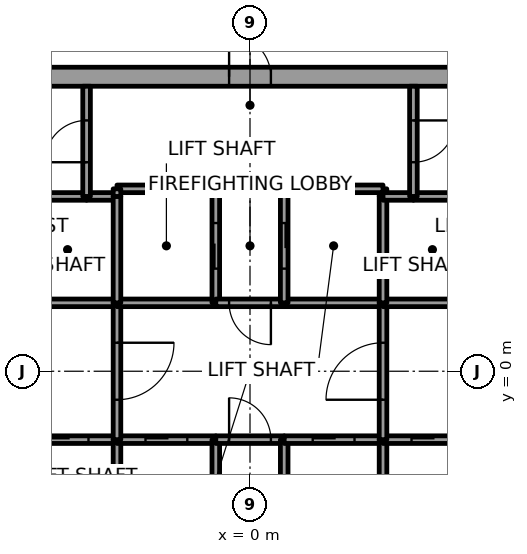
"""IFC4 building model, lengths in metres.
Left out: names, types, materials, properties, quantities, classifications, styles, units other than length and angle.
Written with IfcOpenShell. Run it as: python <this file> out.ifc"""

import sys

from ifc_helpers import new_model, si_unit, direction, frame, frame_2d, origin, place, context, subcontext, project, spatial, rectangle, extrude, element, fill, save


model = new_model("IFC4")
c1 = context("Model", 3, precision=1e-05, world=origin(), true_north=direction((0.0, 1.0)))
c2 = subcontext(c1, "Body", "Model", "MODEL_VIEW")
j1 = project(units=[si_unit("LENGTHUNIT", "METRE"), si_unit("PLANEANGLEUNIT", "RADIAN")], contexts=[c1])
p1 = place(None, origin())
s1 = spatial("IfcSite", under=j1, at=p1, CompositionType="ELEMENT")
p2 = place(p1, origin())
s2 = spatial("IfcBuilding", under=s1, at=p2, CompositionType="ELEMENT")
p3 = place(p2, frame((0.0, 0.0, 141.8)))
s3 = spatial("IfcBuildingStorey", under=s2, at=p3, CompositionType="ELEMENT", Elevation=141.8)
p4 = place(p3, frame((-11.0, 7.75, 0.0), z_axis=(0.0, 0.0, 1.0), x_axis=(1.0, 0.0, 0.0)))
e1 = element("IfcWall", 1, at=p4, inside=s3, PredefinedType="SHEAR", context=c2, shape_type="SweptSolid", body=[
    extrude(rectangle(XDim=22.0, YDim=0.5, at=frame_2d((11.0, 0.0))), origin(), (0.0, 0.0, 1.0), 4.0),
])
p5 = place(p4, frame((10.45, 0.0, 0.0)))
e2 = element("IfcOpeningElement", 2, at=p5, cuts=e1, PredefinedType="OPENING", context=c2, shape_type="SweptSolid", body=[
    extrude(rectangle(XDim=1.1, YDim=2.1, at=frame_2d((0.55, 1.05))), frame((0.0, 0.25, 0.0), z_axis=(0.0, -1.0, 0.0), x_axis=(1.0, 0.0, 0.0)), (0.0, 0.0, 1.0), 0.5),
])
p6 = place(p3, frame((-6.1, -1.8, 0.0), z_axis=(0.0, 0.0, 1.0), x_axis=(1.0, 0.0, 0.0)))
e3 = element("IfcWall", 3, at=p6, inside=s3, PredefinedType="SOLIDWALL", context=c2, shape_type="SweptSolid", body=[
    extrude(rectangle(XDim=2.6, YDim=0.2, at=frame_2d((1.3, 0.0))), origin(), (0.0, 0.0, 1.0), 3.85),
])
p7 = place(p6, frame((0.75, 0.0, 0.0)))
e4 = element("IfcOpeningElement", 4, at=p7, cuts=e3, PredefinedType="OPENING", context=c2, shape_type="SweptSolid", body=[
    extrude(rectangle(XDim=1.1, YDim=2.1, at=frame_2d((0.55, 1.05))), frame((0.0, 0.1, 0.0), z_axis=(0.0, -1.0, 0.0), x_axis=(1.0, 0.0, 0.0)), (0.0, 0.0, 1.0), 0.2),
])
p8 = place(p3, frame((-3.5, 1.8, 0.0), z_axis=(0.0, 0.0, 1.0), x_axis=(-1.0, 0.0, 0.0)))
e5 = element("IfcWall", 5, at=p8, inside=s3, PredefinedType="SOLIDWALL", context=c2, shape_type="SweptSolid", body=[
    extrude(rectangle(XDim=2.6, YDim=0.2, at=frame_2d((1.3, 0.0))), origin(), (0.0, 0.0, 1.0), 3.85),
])
p9 = place(p3, frame((-4.3, 4.6, 0.0), z_axis=(0.0, 0.0, 1.0), x_axis=(-1.0, 0.0, 0.0)))
e6 = element("IfcWall", 6, at=p9, inside=s3, PredefinedType="SOLIDWALL", context=c2, shape_type="SweptSolid", body=[
    extrude(rectangle(XDim=1.8, YDim=0.2, at=frame_2d((0.9, 0.0))), origin(), (0.0, 0.0, 1.0), 3.85),
])
p10 = place(p3, frame((-3.5, 4.6, 0.0), z_axis=(0.0, 0.0, 1.0), x_axis=(-1.0, 0.0, 0.0)))
e7 = element("IfcWall", 7, at=p10, inside=s3, PredefinedType="SOLIDWALL", context=c2, shape_type="SweptSolid", body=[
    extrude(rectangle(XDim=0.8, YDim=0.2, at=frame_2d((0.4, 0.0))), origin(), (0.0, 0.0, 1.0), 3.85),
])
p11 = place(p3, frame((-4.3, 4.6, 0.0), z_axis=(0.0, 0.0, 1.0), x_axis=(0.0, 1.0, 0.0)))
e8 = element("IfcWall", 8, at=p11, inside=s3, PredefinedType="SOLIDWALL", context=c2, shape_type="SweptSolid", body=[
    extrude(rectangle(XDim=2.9, YDim=0.2, at=frame_2d((1.45, 0.0))), origin(), (0.0, 0.0, 1.0), 3.85),
])
p12 = place(p11, frame((0.9, 0.0, 0.0)))
e9 = element("IfcOpeningElement", 9, at=p12, cuts=e8, PredefinedType="OPENING", context=c2, shape_type="SweptSolid", body=[
    extrude(rectangle(XDim=1.1, YDim=2.1, at=frame_2d((0.55, 1.05))), frame((0.0, 0.1, 0.0), z_axis=(0.0, -1.0, 0.0), x_axis=(1.0, 0.0, 0.0)), (0.0, 0.0, 1.0), 0.2),
])
p13 = place(p3, frame((-3.5, -4.6, 0.0), z_axis=(0.0, 0.0, 1.0), x_axis=(0.0, 1.0, 0.0)))
e10 = element("IfcWall", 10, at=p13, inside=s3, PredefinedType="SOLIDWALL", context=c2, shape_type="SweptSolid", body=[
    extrude(rectangle(XDim=2.8, YDim=0.2, at=frame_2d((1.4, 0.0))), origin(), (0.0, 0.0, 1.0), 3.85),
])
p14 = place(p3, frame((-3.5, -1.8, 0.0), z_axis=(0.0, 0.0, 1.0), x_axis=(1.0, 0.0, 0.0)))
e11 = element("IfcWall", 11, at=p14, inside=s3, PredefinedType="SOLIDWALL", context=c2, shape_type="SweptSolid", body=[
    extrude(rectangle(XDim=2.6, YDim=0.2, at=frame_2d((1.3, 0.0))), origin(), (0.0, 0.0, 1.0), 3.85),
])
p15 = place(p14, frame((0.75, 0.0, 0.0)))
e12 = element("IfcOpeningElement", 12, at=p15, cuts=e11, PredefinedType="OPENING", context=c2, shape_type="SweptSolid", body=[
    extrude(rectangle(XDim=1.1, YDim=2.1, at=frame_2d((0.55, 1.05))), frame((0.0, 0.1, 0.0), z_axis=(0.0, -1.0, 0.0), x_axis=(1.0, 0.0, 0.0)), (0.0, 0.0, 1.0), 0.2),
])
p16 = place(p3, frame((-3.5, 1.8, 0.0), z_axis=(0.0, 0.0, 1.0), x_axis=(0.0, -1.0, 0.0)))
e13 = element("IfcWall", 13, at=p16, inside=s3, PredefinedType="SOLIDWALL", context=c2, shape_type="SweptSolid", body=[
    extrude(rectangle(XDim=3.6, YDim=0.2, at=frame_2d((1.8, 0.0))), origin(), (0.0, 0.0, 1.0), 3.85),
])
p17 = place(p16, frame((1.05, 0.0, 0.0)))
e14 = element("IfcOpeningElement", 14, at=p17, cuts=e13, PredefinedType="OPENING", context=c2, shape_type="SweptSolid", body=[
    extrude(rectangle(XDim=1.5, YDim=2.1, at=frame_2d((0.75, 1.05))), frame((0.0, 0.1, 0.0), z_axis=(0.0, -1.0, 0.0), x_axis=(1.0, 0.0, 0.0)), (0.0, 0.0, 1.0), 0.2),
])
p18 = place(p3, frame((-0.9, 1.8, 0.0), z_axis=(0.0, 0.0, 1.0), x_axis=(-1.0, 0.0, 0.0)))
e15 = element("IfcWall", 15, at=p18, inside=s3, PredefinedType="SOLIDWALL", context=c2, shape_type="SweptSolid", body=[
    extrude(rectangle(XDim=2.6, YDim=0.2, at=frame_2d((1.3, 0.0))), origin(), (0.0, 0.0, 1.0), 3.85),
])
p19 = place(p3, frame((-3.5, 4.6, 0.0), z_axis=(0.0, 0.0, 1.0), x_axis=(0.0, -1.0, 0.0)))
e16 = element("IfcWall", 16, at=p19, inside=s3, PredefinedType="SOLIDWALL", context=c2, shape_type="SweptSolid", body=[
    extrude(rectangle(XDim=2.8, YDim=0.2, at=frame_2d((1.4, 0.0))), origin(), (0.0, 0.0, 1.0), 3.85),
])
p20 = place(p3, frame((-0.9, 1.8, 0.0), z_axis=(0.0, 0.0, 1.0), x_axis=(0.0, 1.0, 0.0)))
e17 = element("IfcWall", 17, at=p20, inside=s3, PredefinedType="SOLIDWALL", context=c2, shape_type="SweptSolid", body=[
    extrude(rectangle(XDim=3.0, YDim=0.2, at=frame_2d((1.5, 0.0))), origin(), (0.0, 0.0, 1.0), 3.85),
])
p21 = place(p20, frame((0.9, 0.0, 0.0)))
e18 = element("IfcOpeningElement", 18, at=p21, cuts=e17, PredefinedType="OPENING", context=c2, shape_type="SweptSolid", body=[
    extrude(rectangle(XDim=1.2, YDim=2.1, at=frame_2d((0.6, 1.05))), frame((0.0, 0.1, 0.0), z_axis=(0.0, -1.0, 0.0), x_axis=(1.0, 0.0, 0.0)), (0.0, 0.0, 1.0), 0.2),
])
p22 = place(p3, frame((-0.9, 4.8, 0.0), z_axis=(0.0, 0.0, 1.0), x_axis=(-1.0, 0.0, 0.0)))
e19 = element("IfcWall", 19, at=p22, inside=s3, PredefinedType="SOLIDWALL", context=c2, shape_type="SweptSolid", body=[
    extrude(rectangle(XDim=2.6, YDim=0.2, at=frame_2d((1.3, 0.0))), origin(), (0.0, 0.0, 1.0), 3.85),
])
p23 = place(p3, frame((-3.5, 4.8, 0.0), z_axis=(0.0, 0.0, 1.0), x_axis=(0.0, -1.0, 0.0)))
e20 = element("IfcWall", 20, at=p23, inside=s3, PredefinedType="SOLIDWALL", context=c2, shape_type="SweptSolid", body=[
    extrude(rectangle(XDim=0.2, YDim=0.2, at=frame_2d((0.1, 0.0))), origin(), (0.0, 0.0, 1.0), 3.85),
])
p24 = place(p3, frame((-0.9, -4.6, 0.0), z_axis=(0.0, 0.0, 1.0), x_axis=(0.0, 1.0, 0.0)))
e21 = element("IfcWall", 21, at=p24, inside=s3, PredefinedType="SOLIDWALL", context=c2, shape_type="SweptSolid", body=[
    extrude(rectangle(XDim=2.8, YDim=0.2, at=frame_2d((1.4, 0.0))), origin(), (0.0, 0.0, 1.0), 3.85),
])
p25 = place(p3, frame((-0.9, -1.8, 0.0), z_axis=(0.0, 0.0, 1.0), x_axis=(1.0, 0.0, 0.0)))
e22 = element("IfcWall", 22, at=p25, inside=s3, PredefinedType="SOLIDWALL", context=c2, shape_type="SweptSolid", body=[
    extrude(rectangle(XDim=1.8, YDim=0.2, at=frame_2d((0.9, 0.0))), origin(), (0.0, 0.0, 1.0), 3.85),
])
p26 = place(p25, frame((0.35, 0.0, 0.0)))
e23 = element("IfcOpeningElement", 23, at=p26, cuts=e22, PredefinedType="OPENING", context=c2, shape_type="SweptSolid", body=[
    extrude(rectangle(XDim=1.1, YDim=2.1, at=frame_2d((0.55, 1.05))), frame((0.0, 0.1, 0.0), z_axis=(0.0, -1.0, 0.0), x_axis=(1.0, 0.0, 0.0)), (0.0, 0.0, 1.0), 0.2),
])
p27 = place(p3, frame((0.9, 1.8, 0.0), z_axis=(0.0, 0.0, 1.0), x_axis=(-1.0, 0.0, 0.0)))
e24 = element("IfcWall", 24, at=p27, inside=s3, PredefinedType="SOLIDWALL", context=c2, shape_type="SweptSolid", body=[
    extrude(rectangle(XDim=1.8, YDim=0.2, at=frame_2d((0.9, 0.0))), origin(), (0.0, 0.0, 1.0), 3.85),
])
p28 = place(p27, frame((0.35, 0.0, 0.0)))
e25 = element("IfcOpeningElement", 25, at=p28, cuts=e24, PredefinedType="OPENING", context=c2, shape_type="SweptSolid", body=[
    extrude(rectangle(XDim=1.1, YDim=2.1, at=frame_2d((0.55, 1.05))), frame((0.0, 0.1, 0.0), z_axis=(0.0, -1.0, 0.0), x_axis=(1.0, 0.0, 0.0)), (0.0, 0.0, 1.0), 0.2),
])
p29 = place(p3, frame((0.9, -1.8, 0.0), z_axis=(0.0, 0.0, 1.0), x_axis=(0.0, -1.0, 0.0)))
e26 = element("IfcWall", 26, at=p29, inside=s3, PredefinedType="SOLIDWALL", context=c2, shape_type="SweptSolid", body=[
    extrude(rectangle(XDim=2.8, YDim=0.2, at=frame_2d((1.4, 0.0))), origin(), (0.0, 0.0, 1.0), 3.85),
])
p30 = place(p3, frame((0.9, -1.8, 0.0), z_axis=(0.0, 0.0, 1.0), x_axis=(1.0, 0.0, 0.0)))
e27 = element("IfcWall", 27, at=p30, inside=s3, PredefinedType="SOLIDWALL", context=c2, shape_type="SweptSolid", body=[
    extrude(rectangle(XDim=2.6, YDim=0.2, at=frame_2d((1.3, 0.0))), origin(), (0.0, 0.0, 1.0), 3.85),
])
p31 = place(p30, frame((0.75, 0.0, 0.0)))
e28 = element("IfcOpeningElement", 28, at=p31, cuts=e27, PredefinedType="OPENING", context=c2, shape_type="SweptSolid", body=[
    extrude(rectangle(XDim=1.1, YDim=2.1, at=frame_2d((0.55, 1.05))), frame((0.0, 0.1, 0.0), z_axis=(0.0, -1.0, 0.0), x_axis=(1.0, 0.0, 0.0)), (0.0, 0.0, 1.0), 0.2),
])
p32 = place(p3, frame((3.5, 1.8, 0.0), z_axis=(0.0, 0.0, 1.0), x_axis=(-1.0, 0.0, 0.0)))
e29 = element("IfcWall", 29, at=p32, inside=s3, PredefinedType="SOLIDWALL", context=c2, shape_type="SweptSolid", body=[
    extrude(rectangle(XDim=2.6, YDim=0.2, at=frame_2d((1.3, 0.0))), origin(), (0.0, 0.0, 1.0), 3.85),
])
p33 = place(p3, frame((3.5, 4.6, 0.0), z_axis=(0.0, 0.0, 1.0), x_axis=(0.0, 1.0, 0.0)))
e30 = element("IfcWall", 30, at=p33, inside=s3, PredefinedType="SOLIDWALL", context=c2, shape_type="SweptSolid", body=[
    extrude(rectangle(XDim=0.2, YDim=0.2, at=frame_2d((0.1, 0.0))), origin(), (0.0, 0.0, 1.0), 3.85),
])
p34 = place(p3, frame((3.5, 4.8, 0.0), z_axis=(0.0, 0.0, 1.0), x_axis=(-1.0, 0.0, 0.0)))
e31 = element("IfcWall", 31, at=p34, inside=s3, PredefinedType="SOLIDWALL", context=c2, shape_type="SweptSolid", body=[
    extrude(rectangle(XDim=2.6, YDim=0.2, at=frame_2d((1.3, 0.0))), origin(), (0.0, 0.0, 1.0), 3.85),
])
p35 = place(p3, frame((0.9, 4.8, 0.0), z_axis=(0.0, 0.0, 1.0), x_axis=(0.0, -1.0, 0.0)))
e32 = element("IfcWall", 32, at=p35, inside=s3, PredefinedType="SOLIDWALL", context=c2, shape_type="SweptSolid", body=[
    extrude(rectangle(XDim=3.0, YDim=0.2, at=frame_2d((1.5, 0.0))), origin(), (0.0, 0.0, 1.0), 3.85),
])
p36 = place(p35, frame((0.9, 0.0, 0.0)))
e33 = element("IfcOpeningElement", 33, at=p36, cuts=e32, PredefinedType="OPENING", context=c2, shape_type="SweptSolid", body=[
    extrude(rectangle(XDim=1.2, YDim=2.1, at=frame_2d((0.6, 1.05))), frame((0.0, 0.1, 0.0), z_axis=(0.0, -1.0, 0.0), x_axis=(1.0, 0.0, 0.0)), (0.0, 0.0, 1.0), 0.2),
])
p37 = place(p3, frame((3.5, -4.6, 0.0), z_axis=(0.0, 0.0, 1.0), x_axis=(0.0, 1.0, 0.0)))
e34 = element("IfcWall", 34, at=p37, inside=s3, PredefinedType="SOLIDWALL", context=c2, shape_type="SweptSolid", body=[
    extrude(rectangle(XDim=2.8, YDim=0.2, at=frame_2d((1.4, 0.0))), origin(), (0.0, 0.0, 1.0), 3.85),
])
p38 = place(p3, frame((3.5, -1.8, 0.0), z_axis=(0.0, 0.0, 1.0), x_axis=(1.0, 0.0, 0.0)))
e35 = element("IfcWall", 35, at=p38, inside=s3, PredefinedType="SOLIDWALL", context=c2, shape_type="SweptSolid", body=[
    extrude(rectangle(XDim=2.6, YDim=0.2, at=frame_2d((1.3, 0.0))), origin(), (0.0, 0.0, 1.0), 3.85),
])
p39 = place(p38, frame((0.75, 0.0, 0.0)))
e36 = element("IfcOpeningElement", 36, at=p39, cuts=e35, PredefinedType="OPENING", context=c2, shape_type="SweptSolid", body=[
    extrude(rectangle(XDim=1.1, YDim=2.1, at=frame_2d((0.55, 1.05))), frame((0.0, 0.1, 0.0), z_axis=(0.0, -1.0, 0.0), x_axis=(1.0, 0.0, 0.0)), (0.0, 0.0, 1.0), 0.2),
])
p40 = place(p3, frame((3.5, -1.8, 0.0), z_axis=(0.0, 0.0, 1.0), x_axis=(0.0, 1.0, 0.0)))
e37 = element("IfcWall", 37, at=p40, inside=s3, PredefinedType="SOLIDWALL", context=c2, shape_type="SweptSolid", body=[
    extrude(rectangle(XDim=3.6, YDim=0.2, at=frame_2d((1.8, 0.0))), origin(), (0.0, 0.0, 1.0), 3.85),
])
p41 = place(p40, frame((1.05, 0.0, 0.0)))
e38 = element("IfcOpeningElement", 38, at=p41, cuts=e37, PredefinedType="OPENING", context=c2, shape_type="SweptSolid", body=[
    extrude(rectangle(XDim=1.5, YDim=2.1, at=frame_2d((0.75, 1.05))), frame((0.0, 0.1, 0.0), z_axis=(0.0, -1.0, 0.0), x_axis=(1.0, 0.0, 0.0)), (0.0, 0.0, 1.0), 0.2),
])
p42 = place(p3, frame((6.1, 1.8, 0.0), z_axis=(0.0, 0.0, 1.0), x_axis=(-1.0, 0.0, 0.0)))
e39 = element("IfcWall", 39, at=p42, inside=s3, PredefinedType="SOLIDWALL", context=c2, shape_type="SweptSolid", body=[
    extrude(rectangle(XDim=2.6, YDim=0.2, at=frame_2d((1.3, 0.0))), origin(), (0.0, 0.0, 1.0), 3.85),
])
p43 = place(p3, frame((3.5, 1.8, 0.0), z_axis=(0.0, 0.0, 1.0), x_axis=(0.0, 1.0, 0.0)))
e40 = element("IfcWall", 40, at=p43, inside=s3, PredefinedType="SOLIDWALL", context=c2, shape_type="SweptSolid", body=[
    extrude(rectangle(XDim=2.8, YDim=0.2, at=frame_2d((1.4, 0.0))), origin(), (0.0, 0.0, 1.0), 3.85),
])
p44 = place(p3, frame((4.3, 4.6, 0.0), z_axis=(0.0, 0.0, 1.0), x_axis=(-1.0, 0.0, 0.0)))
e41 = element("IfcWall", 41, at=p44, inside=s3, PredefinedType="SOLIDWALL", context=c2, shape_type="SweptSolid", body=[
    extrude(rectangle(XDim=0.8, YDim=0.2, at=frame_2d((0.4, 0.0))), origin(), (0.0, 0.0, 1.0), 3.85),
])
p45 = place(p3, frame((6.1, 4.6, 0.0), z_axis=(0.0, 0.0, 1.0), x_axis=(-1.0, 0.0, 0.0)))
e42 = element("IfcWall", 42, at=p45, inside=s3, PredefinedType="SOLIDWALL", context=c2, shape_type="SweptSolid", body=[
    extrude(rectangle(XDim=1.8, YDim=0.2, at=frame_2d((0.9, 0.0))), origin(), (0.0, 0.0, 1.0), 3.85),
])
p46 = place(p3, frame((4.3, 7.5, 0.0), z_axis=(0.0, 0.0, 1.0), x_axis=(0.0, -1.0, 0.0)))
e43 = element("IfcWall", 43, at=p46, inside=s3, PredefinedType="SOLIDWALL", context=c2, shape_type="SweptSolid", body=[
    extrude(rectangle(XDim=2.9, YDim=0.2, at=frame_2d((1.45, 0.0))), origin(), (0.0, 0.0, 1.0), 3.85),
])
p47 = place(p46, frame((0.9, 0.0, 0.0)))
e44 = element("IfcOpeningElement", 44, at=p47, cuts=e43, PredefinedType="OPENING", context=c2, shape_type="SweptSolid", body=[
    extrude(rectangle(XDim=1.1, YDim=2.1, at=frame_2d((0.55, 1.05))), frame((0.0, 0.1, 0.0), z_axis=(0.0, -1.0, 0.0), x_axis=(1.0, 0.0, 0.0)), (0.0, 0.0, 1.0), 0.2),
])
p48 = place(p7, origin())
e45 = element("IfcDoor", 45, at=p48, inside=s3, OperationType="SLIDING_TO_RIGHT", PredefinedType="DOOR", context=c2, shape_type="SweptSolid", body=[
    extrude(rectangle(XDim=1.1, YDim=2.1, at=frame_2d((0.55, 1.05))), frame((0.0, 0.025, 0.0), z_axis=(0.0, -1.0, 0.0), x_axis=(1.0, 0.0, 0.0)), (0.0, 0.0, 1.0), 0.05),
])
fill(e4, e45)
p49 = place(p15, origin())
e46 = element("IfcDoor", 46, at=p49, inside=s3, OperationType="SLIDING_TO_LEFT", PredefinedType="DOOR", context=c2, shape_type="SweptSolid", body=[
    extrude(rectangle(XDim=1.1, YDim=2.1, at=frame_2d((0.55, 1.05))), frame((0.0, 0.025, 0.0), z_axis=(0.0, -1.0, 0.0), x_axis=(1.0, 0.0, 0.0)), (0.0, 0.0, 1.0), 0.05),
])
fill(e12, e46)
p50 = place(p31, origin())
e47 = element("IfcDoor", 47, at=p50, inside=s3, OperationType="SLIDING_TO_RIGHT", PredefinedType="DOOR", context=c2, shape_type="SweptSolid", body=[
    extrude(rectangle(XDim=1.1, YDim=2.1, at=frame_2d((0.55, 1.05))), frame((0.0, 0.025, 0.0), z_axis=(0.0, -1.0, 0.0), x_axis=(1.0, 0.0, 0.0)), (0.0, 0.0, 1.0), 0.05),
])
fill(e28, e47)
p51 = place(p39, origin())
e48 = element("IfcDoor", 48, at=p51, inside=s3, OperationType="SLIDING_TO_RIGHT", PredefinedType="DOOR", context=c2, shape_type="SweptSolid", body=[
    extrude(rectangle(XDim=1.1, YDim=2.1, at=frame_2d((0.55, 1.05))), frame((0.0, 0.025, 0.0), z_axis=(0.0, -1.0, 0.0), x_axis=(1.0, 0.0, 0.0)), (0.0, 0.0, 1.0), 0.05),
])
fill(e36, e48)
p52 = place(p21, origin())
e49 = element("IfcDoor", 49, at=p52, inside=s3, OperationType="SLIDING_TO_LEFT", PredefinedType="DOOR", context=c2, shape_type="SweptSolid", body=[
    extrude(rectangle(XDim=1.2, YDim=2.1, at=frame_2d((0.6, 1.05))), frame((0.0, 0.025, 0.0), z_axis=(0.0, -1.0, 0.0), x_axis=(1.0, 0.0, 0.0)), (0.0, 0.0, 1.0), 0.05),
])
fill(e18, e49)
p53 = place(p36, origin())
e50 = element("IfcDoor", 50, at=p53, inside=s3, OperationType="SLIDING_TO_LEFT", PredefinedType="DOOR", context=c2, shape_type="SweptSolid", body=[
    extrude(rectangle(XDim=1.2, YDim=2.1, at=frame_2d((0.6, 1.05))), frame((0.0, 0.025, 0.0), z_axis=(0.0, -1.0, 0.0), x_axis=(1.0, 0.0, 0.0)), (0.0, 0.0, 1.0), 0.05),
])
fill(e33, e50)
p54 = place(p17, origin())
e51 = element("IfcDoor", 51, at=p54, inside=s3, OperationType="DOUBLE_DOOR_SINGLE_SWING", PredefinedType="DOOR", context=c2, shape_type="SweptSolid", body=[
    extrude(rectangle(XDim=1.5, YDim=2.1, at=frame_2d((0.75, 1.05))), frame((0.0, 0.025, 0.0), z_axis=(0.0, -1.0, 0.0), x_axis=(1.0, 0.0, 0.0)), (0.0, 0.0, 1.0), 0.05),
])
fill(e14, e51)
p55 = place(p41, origin())
e52 = element("IfcDoor", 52, at=p55, inside=s3, OperationType="DOUBLE_DOOR_SINGLE_SWING", PredefinedType="DOOR", context=c2, shape_type="SweptSolid", body=[
    extrude(rectangle(XDim=1.5, YDim=2.1, at=frame_2d((0.75, 1.05))), frame((0.0, 0.025, 0.0), z_axis=(0.0, -1.0, 0.0), x_axis=(1.0, 0.0, 0.0)), (0.0, 0.0, 1.0), 0.05),
])
fill(e38, e52)
p56 = place(p28, origin())
e53 = element("IfcDoor", 53, at=p56, inside=s3, OperationType="SINGLE_SWING_RIGHT", PredefinedType="DOOR", context=c2, shape_type="SweptSolid", body=[
    extrude(rectangle(XDim=1.1, YDim=2.1, at=frame_2d((0.55, 1.05))), frame((0.0, 0.025, 0.0), z_axis=(0.0, -1.0, 0.0), x_axis=(1.0, 0.0, 0.0)), (0.0, 0.0, 1.0), 0.05),
])
fill(e25, e53)
p57 = place(p26, origin())
e54 = element("IfcDoor", 54, at=p57, inside=s3, OperationType="SINGLE_SWING_LEFT", PredefinedType="DOOR", context=c2, shape_type="SweptSolid", body=[
    extrude(rectangle(XDim=1.1, YDim=2.1, at=frame_2d((0.55, 1.05))), frame((0.0, 0.025, 0.0), z_axis=(0.0, -1.0, 0.0), x_axis=(1.0, 0.0, 0.0)), (0.0, 0.0, 1.0), 0.05),
])
fill(e23, e54)
p58 = place(p12, origin())
e55 = element("IfcDoor", 55, at=p58, inside=s3, OperationType="SINGLE_SWING_RIGHT", PredefinedType="DOOR", context=c2, shape_type="SweptSolid", body=[
    extrude(rectangle(XDim=1.1, YDim=2.1, at=frame_2d((0.55, 1.05))), frame((0.0, 0.025, 0.0), z_axis=(0.0, -1.0, 0.0), x_axis=(1.0, 0.0, 0.0)), (0.0, 0.0, 1.0), 0.05),
])
fill(e9, e55)
p59 = place(p47, origin())
e56 = element("IfcDoor", 56, at=p59, inside=s3, OperationType="SINGLE_SWING_LEFT", PredefinedType="DOOR", context=c2, shape_type="SweptSolid", body=[
    extrude(rectangle(XDim=1.1, YDim=2.1, at=frame_2d((0.55, 1.05))), frame((0.0, 0.025, 0.0), z_axis=(0.0, -1.0, 0.0), x_axis=(1.0, 0.0, 0.0)), (0.0, 0.0, 1.0), 0.05),
])
fill(e44, e56)
p60 = place(p5, origin())
e57 = element("IfcDoor", 57, at=p60, inside=s3, OperationType="SINGLE_SWING_RIGHT", PredefinedType="DOOR", context=c2, shape_type="SweptSolid", body=[
    extrude(rectangle(XDim=1.1, YDim=2.1, at=frame_2d((0.55, 1.05))), frame((0.0, 0.025, 0.0), z_axis=(0.0, -1.0, 0.0), x_axis=(1.0, 0.0, 0.0)), (0.0, 0.0, 1.0), 0.05),
])
fill(e2, e57)
save(model, sys.argv[1])
